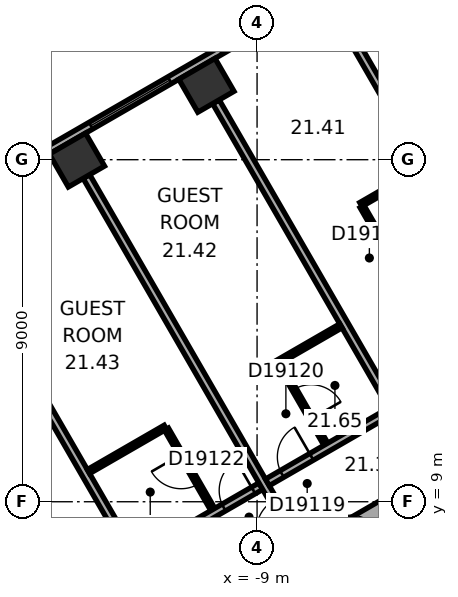
"""IFC4 building model, lengths in metres.
Left out: names, types, materials, properties, quantities, classifications, styles, units other than length and angle.
Written with IfcOpenShell. Run it as: python <this file> out.ifc"""

import sys

from ifc_helpers import new_model, si_unit, direction, frame, frame_2d, origin, origin_2d, place, context, subcontext, project, spatial, rectangle, extrude, element, fill, save


model = new_model("IFC4")
c1 = context("Model", 3, precision=1e-05, world=origin(), true_north=direction((0.0, 1.0)))
c2 = subcontext(c1, "Body", "Model", "MODEL_VIEW")
j1 = project(units=[si_unit("LENGTHUNIT", "METRE"), si_unit("PLANEANGLEUNIT", "RADIAN")], contexts=[c1])
p1 = place(None, origin())
s1 = spatial("IfcSite", under=j1, at=p1, CompositionType="ELEMENT")
p2 = place(p1, origin())
s2 = spatial("IfcBuilding", under=s1, at=p2, CompositionType="ELEMENT")
p3 = place(p2, frame((0.0, 0.0, 93.5)))
s3 = spatial("IfcBuildingStorey", under=s2, at=p3, CompositionType="ELEMENT", Elevation=93.5)
for number, where, z_axis, x_axis in (
    (1, (-10.333, 19.957, 0.0), (0.0, 0.0, 1.0), (-0.866, -0.5, 0.0)),
    (2, (-13.74, 17.99, 0.0), (0.0, 0.0, 1.0), (-0.866, -0.5, 0.0)),
):
    element("IfcColumn", number, at=place(p3, frame(where, z_axis=z_axis, x_axis=x_axis)), inside=s3, PredefinedType="COLUMN", context=c2, shape_type="SweptSolid", body=[
        extrude(rectangle(XDim=1.1, YDim=1.0, at=origin_2d()), origin(), (0.0, 0.0, 1.0), 3.3),
    ])
p4 = place(p3, frame((0.3, 11.836, 0.0), z_axis=(0.0, 0.0, 1.0), x_axis=(-0.866021384402, -0.500006961711, 0.0)))
e3 = element("IfcWall", 3, at=p4, inside=s3, PredefinedType="SHEAR", context=c2, shape_type="SweptSolid", body=[
    extrude(rectangle(XDim=12.355, YDim=1.2, at=frame_2d((6.178, 0.0))), origin(), (0.0, 0.0, 1.0), 3.3),
])
p5 = place(p4, frame((6.378, 0.0, 0.0)))
e4 = element("IfcOpeningElement", 4, at=p5, cuts=e3, PredefinedType="OPENING", context=c2, shape_type="SweptSolid", body=[
    extrude(rectangle(XDim=1.5, YDim=2.1, at=frame_2d((0.75, 1.05))), frame((0.0, 0.61, 0.0), z_axis=(0.0, -1.0, 0.0), x_axis=(1.0, 0.0, 0.0)), (0.0, 0.0, 1.0), 1.22),
])
p6 = place(p4, frame((1.828, 0.0, 0.0)))
e5 = element("IfcOpeningElement", 5, at=p6, cuts=e3, PredefinedType="OPENING", context=c2, shape_type="SweptSolid", body=[
    extrude(rectangle(XDim=1.1, YDim=2.1, at=frame_2d((0.55, 1.05))), frame((0.0, 0.61, 0.0), z_axis=(0.0, -1.0, 0.0), x_axis=(1.0, 0.0, 0.0)), (0.0, 0.0, 1.0), 1.22),
])
p7 = place(p3, frame((-3.136, 24.805, 0.0), z_axis=(0.0, 0.0, 1.0), x_axis=(-0.866028291626, -0.499994998079, 0.0)))
e6 = element("IfcWall", 6, at=p7, inside=s3, PredefinedType="STANDARD", context=c2, shape_type="SweptSolid", body=[
    extrude(rectangle(XDim=21.246, YDim=0.2, at=frame_2d((10.623, 0.0))), origin(), (0.0, 0.0, 1.0), 3.3),
])
p8 = place(p7, frame((1.555, 0.0, 0.8)))
e7 = element("IfcOpeningElement", 7, at=p8, cuts=e6, PredefinedType="OPENING", context=c2, shape_type="SweptSolid", body=[
    extrude(rectangle(XDim=2.4, YDim=1.7, at=frame_2d((1.2, 0.85))), frame((0.0, 0.11, 0.0), z_axis=(0.0, -1.0, 0.0), x_axis=(1.0, 0.0, 0.0)), (0.0, 0.0, 1.0), 0.22),
])
p9 = place(p7, frame((5.489, 0.0, 0.8)))
e8 = element("IfcOpeningElement", 8, at=p9, cuts=e6, PredefinedType="OPENING", context=c2, shape_type="SweptSolid", body=[
    extrude(rectangle(XDim=2.4, YDim=1.7, at=frame_2d((1.2, 0.85))), frame((0.0, 0.11, 0.0), z_axis=(0.0, -1.0, 0.0), x_axis=(1.0, 0.0, 0.0)), (0.0, 0.0, 1.0), 0.22),
])
p10 = place(p7, frame((9.424, 0.0, 0.8)))
e9 = element("IfcOpeningElement", 9, at=p10, cuts=e6, PredefinedType="OPENING", context=c2, shape_type="SweptSolid", body=[
    extrude(rectangle(XDim=2.4, YDim=1.7, at=frame_2d((1.2, 0.85))), frame((0.0, 0.11, 0.0), z_axis=(0.0, -1.0, 0.0), x_axis=(1.0, 0.0, 0.0)), (0.0, 0.0, 1.0), 0.22),
])
p11 = place(p7, frame((13.358, 0.0, 0.8)))
e10 = element("IfcOpeningElement", 10, at=p11, cuts=e6, PredefinedType="OPENING", context=c2, shape_type="SweptSolid", body=[
    extrude(rectangle(XDim=2.4, YDim=1.7, at=frame_2d((1.2, 0.85))), frame((0.0, 0.11, 0.0), z_axis=(0.0, -1.0, 0.0), x_axis=(1.0, 0.0, 0.0)), (0.0, 0.0, 1.0), 0.22),
])
p12 = place(p7, frame((17.293, 0.0, 0.8)))
e11 = element("IfcOpeningElement", 11, at=p12, cuts=e6, PredefinedType="OPENING", context=c2, shape_type="SweptSolid", body=[
    extrude(rectangle(XDim=2.4, YDim=1.7, at=frame_2d((1.2, 0.85))), frame((0.0, 0.11, 0.0), z_axis=(0.0, -1.0, 0.0), x_axis=(1.0, 0.0, 0.0)), (0.0, 0.0, 1.0), 0.22),
])
p13 = place(p3, frame((-16.898, 15.59, 0.0), z_axis=(0.0, 0.0, 1.0), x_axis=(0.499994742786, -0.866028439017, 0.0)))
e12 = element("IfcWall", 12, at=p13, inside=s3, PredefinedType="PARTITIONING", context=c2, shape_type="SweptSolid", body=[
    extrude(rectangle(XDim=9.65, YDim=0.2, at=frame_2d((4.825, 0.0))), origin(), (0.0, 0.0, 1.0), 3.05),
])
p14 = place(p3, frame((-13.436, 9.794, 0.0), z_axis=(0.0, 0.0, 1.0), x_axis=(0.866053246676, 0.499951771596, 0.0)))
e13 = element("IfcWall", 13, at=p14, inside=s3, PredefinedType="PARTITIONING", context=c2, shape_type="SweptSolid", body=[
    extrude(rectangle(XDim=2.335, YDim=0.12, at=frame_2d((1.167, 0.0))), origin(), (0.0, 0.0, 1.0), 3.05),
])
p15 = place(p3, frame((-11.385, 10.909, 0.0), z_axis=(0.0, 0.0, 1.0), x_axis=(0.500077547548, -0.865980627057, 0.0)))
e14 = element("IfcWall", 14, at=p15, inside=s3, PredefinedType="PARTITIONING", context=c2, shape_type="SweptSolid", body=[
    extrude(rectangle(XDim=2.44, YDim=0.12, at=frame_2d((1.22, 0.0))), origin(), (0.0, 0.0, 1.0), 3.05),
])
p16 = place(p15, frame((0.77, 0.0, 0.0)))
e15 = element("IfcOpeningElement", 15, at=p16, cuts=e14, PredefinedType="OPENING", context=c2, shape_type="SweptSolid", body=[
    extrude(rectangle(XDim=0.9, YDim=2.1, at=frame_2d((0.45, 1.05))), frame((0.0, 0.07, 0.0), z_axis=(0.0, -1.0, 0.0), x_axis=(1.0, 0.0, 0.0)), (0.0, 0.0, 1.0), 0.14),
])
p17 = place(p3, frame((-10.083, 19.524, 0.0), z_axis=(0.0, 0.0, 1.0), x_axis=(0.499999662836, -0.866025598446, 0.0)))
e16 = element("IfcWall", 16, at=p17, inside=s3, PredefinedType="PARTITIONING", context=c2, shape_type="SweptSolid", body=[
    extrude(rectangle(XDim=9.25, YDim=0.2, at=frame_2d((4.625, 0.0))), origin(), (0.0, 0.0, 1.0), 2.6),
])
p18 = place(p3, frame((-8.902, 9.41, 0.0), z_axis=(0.0, 0.0, 1.0), x_axis=(-0.866014299198, -0.500019233215, 0.0)))
e17 = element("IfcWall", 17, at=p18, inside=s3, PredefinedType="PARTITIONING", context=c2, shape_type="SweptSolid", body=[
    extrude(rectangle(XDim=3.133, YDim=0.2, at=frame_2d((1.567, 0.0))), origin(), (0.0, 0.0, 1.0), 3.05),
])
p19 = place(p18, frame((0.225, 0.0, 0.0)))
e18 = element("IfcOpeningElement", 18, at=p19, cuts=e17, PredefinedType="OPENING", context=c2, shape_type="SweptSolid", body=[
    extrude(rectangle(XDim=0.9, YDim=2.1, at=frame_2d((0.45, 1.05))), frame((0.0, 0.11, 0.0), z_axis=(0.0, -1.0, 0.0), x_axis=(1.0, 0.0, 0.0)), (0.0, 0.0, 1.0), 0.22),
])
p20 = place(p3, frame((-8.44, 12.679, 0.0), z_axis=(0.0, 0.0, 1.0), x_axis=(0.866044365799, 0.499967155389, 0.0)))
e19 = element("IfcWall", 19, at=p20, inside=s3, PredefinedType="PARTITIONING", context=c2, shape_type="SweptSolid", body=[
    extrude(rectangle(XDim=1.9, YDim=0.12, at=frame_2d((0.95, 0.0))), origin(), (0.0, 0.0, 1.0), 3.05),
])
p21 = place(p3, frame((-7.865, 7.814, 0.0), z_axis=(0.0, 0.0, 1.0), x_axis=(-0.500004234368, 0.866022959057, 0.0)))
e20 = element("IfcWall", 20, at=p21, inside=s3, PredefinedType="PARTITIONING", context=c2, shape_type="SweptSolid", body=[
    extrude(rectangle(XDim=11.25, YDim=0.2, at=frame_2d((5.625, 0.0))), origin(), (0.0, 0.0, 1.0), 3.05),
])
p22 = place(p21, frame((0.5, 0.0, 0.0)))
e21 = element("IfcOpeningElement", 21, at=p22, cuts=e20, PredefinedType="OPENING", context=c2, shape_type="SweptSolid", body=[
    extrude(rectangle(XDim=0.9, YDim=2.1, at=frame_2d((0.45, 1.05))), frame((0.0, 0.11, 0.0), z_axis=(0.0, -1.0, 0.0), x_axis=(1.0, 0.0, 0.0)), (0.0, 0.0, 1.0), 0.22),
])
p23 = place(p3, frame((-7.19, 10.513, 0.0), z_axis=(0.0, 0.0, 1.0), x_axis=(-0.499959183527, 0.866048967903, 0.0)))
e22 = element("IfcWall", 22, at=p23, inside=s3, PredefinedType="PARTITIONING", context=c2, shape_type="SweptSolid", body=[
    extrude(rectangle(XDim=2.44, YDim=0.12, at=frame_2d((1.22, 0.0))), origin(), (0.0, 0.0, 1.0), 3.05),
])
p24 = place(p23, frame((0.77, 0.0, 0.0)))
e23 = element("IfcOpeningElement", 23, at=p24, cuts=e22, PredefinedType="OPENING", context=c2, shape_type="SweptSolid", body=[
    extrude(rectangle(XDim=0.9, YDim=2.1, at=frame_2d((0.45, 1.05))), frame((0.0, 0.07, 0.0), z_axis=(0.0, -1.0, 0.0), x_axis=(1.0, 0.0, 0.0)), (0.0, 0.0, 1.0), 0.14),
])
p25 = place(p3, frame((-6.676, 21.492, 0.0), z_axis=(0.0, 0.0, 1.0), x_axis=(0.500011263043, -0.866018900966, 0.0)))
e24 = element("IfcWall", 24, at=p25, inside=s3, PredefinedType="PARTITIONING", context=c2, shape_type="SweptSolid", body=[
    extrude(rectangle(XDim=8.049, YDim=0.2, at=frame_2d((4.024, 0.0))), origin(), (0.0, 0.0, 1.0), 3.05),
])
p26 = place(p3, frame((-6.268, 16.82, 0.0), z_axis=(0.0, 0.0, 1.0), x_axis=(0.866002662425, 0.500039387122, 0.0)))
e25 = element("IfcWall", 25, at=p26, inside=s3, PredefinedType="PARTITIONING", context=c2, shape_type="SweptSolid", body=[
    extrude(rectangle(XDim=1.4, YDim=0.12, at=frame_2d((0.7, 0.0))), origin(), (0.0, 0.0, 1.0), 3.05),
])
p27 = place(p3, frame((-4.968, 14.569, 0.0), z_axis=(0.0, 0.0, 1.0), x_axis=(-0.500046963369, 0.865998287773, 0.0)))
e26 = element("IfcWall", 26, at=p27, inside=s3, PredefinedType="PARTITIONING", context=c2, shape_type="SweptSolid", body=[
    extrude(rectangle(XDim=2.54, YDim=0.12, at=frame_2d((1.27, 0.0))), origin(), (0.0, 0.0, 1.0), 3.05),
])
p28 = place(p27, frame((0.82, 0.0, 0.0)))
e27 = element("IfcOpeningElement", 27, at=p28, cuts=e26, PredefinedType="OPENING", context=c2, shape_type="SweptSolid", body=[
    extrude(rectangle(XDim=0.9, YDim=2.1, at=frame_2d((0.45, 1.05))), frame((0.0, 0.07, 0.0), z_axis=(0.0, -1.0, 0.0), x_axis=(1.0, 0.0, 0.0)), (0.0, 0.0, 1.0), 0.14),
])
p29 = place(p3, frame((-4.309, 12.061, 0.0), z_axis=(0.0, 0.0, 1.0), x_axis=(-0.866020679205, -0.500008183122, 0.0)))
e28 = element("IfcWall", 28, at=p29, inside=s3, PredefinedType="PARTITIONING", context=c2, shape_type="SweptSolid", body=[
    extrude(rectangle(XDim=5.104, YDim=0.2, at=frame_2d((2.552, 0.0))), origin(), (0.0, 0.0, 1.0), 3.05),
])
p30 = place(p29, frame((0.185, 0.0, 0.0)))
e29 = element("IfcOpeningElement", 29, at=p30, cuts=e28, PredefinedType="OPENING", context=c2, shape_type="SweptSolid", body=[
    extrude(rectangle(XDim=0.9, YDim=2.1, at=frame_2d((0.45, 1.05))), frame((0.0, 0.11, 0.0), z_axis=(0.0, -1.0, 0.0), x_axis=(1.0, 0.0, 0.0)), (0.0, 0.0, 1.0), 0.22),
])
p31 = place(p29, frame((3.761, 0.0, 0.0)))
e30 = element("IfcOpeningElement", 30, at=p31, cuts=e28, PredefinedType="OPENING", context=c2, shape_type="SweptSolid", body=[
    extrude(rectangle(XDim=0.9, YDim=2.1, at=frame_2d((0.45, 1.05))), frame((0.0, 0.11, 0.0), z_axis=(0.0, -1.0, 0.0), x_axis=(1.0, 0.0, 0.0)), (0.0, 0.0, 1.0), 0.22),
])
p32 = place(p10, origin())
e31 = element("IfcWindow", 31, at=p32, inside=s3, PartitioningType="SINGLE_PANEL", PredefinedType="WINDOW", context=c2, shape_type="SweptSolid", body=[
    extrude(rectangle(XDim=2.4, YDim=1.7, at=frame_2d((1.2, 0.85))), frame((0.0, 0.03, 0.0), z_axis=(0.0, -1.0, 0.0), x_axis=(1.0, 0.0, 0.0)), (0.0, 0.0, 1.0), 0.06),
])
fill(e9, e31)
p33 = place(p5, origin())
e32 = element("IfcDoor", 32, at=p33, inside=s3, OperationType="DOUBLE_DOOR_SINGLE_SWING", PredefinedType="DOOR", context=c2, shape_type="SweptSolid", body=[
    extrude(rectangle(XDim=1.5, YDim=2.1, at=frame_2d((0.75, 1.05))), frame((0.0, 0.025, 0.0), z_axis=(0.0, -1.0, 0.0), x_axis=(1.0, 0.0, 0.0)), (0.0, 0.0, 1.0), 0.05),
])
fill(e4, e32)
p34 = place(p28, origin())
e33 = element("IfcDoor", 33, at=p34, inside=s3, OperationType="SINGLE_SWING_LEFT", PredefinedType="DOOR", context=c2, shape_type="SweptSolid", body=[
    extrude(rectangle(XDim=0.9, YDim=2.1, at=frame_2d((0.45, 1.05))), frame((0.0, 0.025, 0.0), z_axis=(0.0, -1.0, 0.0), x_axis=(1.0, 0.0, 0.0)), (0.0, 0.0, 1.0), 0.05),
])
fill(e27, e33)
p35 = place(p31, origin())
e34 = element("IfcDoor", 34, at=p35, inside=s3, OperationType="SINGLE_SWING_LEFT", PredefinedType="DOOR", context=c2, shape_type="SweptSolid", body=[
    extrude(rectangle(XDim=0.9, YDim=2.1, at=frame_2d((0.45, 1.05))), frame((0.0, 0.025, 0.0), z_axis=(0.0, -1.0, 0.0), x_axis=(1.0, 0.0, 0.0)), (0.0, 0.0, 1.0), 0.05),
])
fill(e30, e34)
p36 = place(p24, origin())
e35 = element("IfcDoor", 35, at=p36, inside=s3, OperationType="SINGLE_SWING_LEFT", PredefinedType="DOOR", context=c2, shape_type="SweptSolid", body=[
    extrude(rectangle(XDim=0.9, YDim=2.1, at=frame_2d((0.45, 1.05))), frame((0.0, 0.025, 0.0), z_axis=(0.0, -1.0, 0.0), x_axis=(1.0, 0.0, 0.0)), (0.0, 0.0, 1.0), 0.05),
])
fill(e23, e35)
p37 = place(p19, origin())
e36 = element("IfcDoor", 36, at=p37, inside=s3, OperationType="SINGLE_SWING_LEFT", PredefinedType="DOOR", context=c2, shape_type="SweptSolid", body=[
    extrude(rectangle(XDim=0.9, YDim=2.1, at=frame_2d((0.45, 1.05))), frame((0.0, 0.025, 0.0), z_axis=(0.0, -1.0, 0.0), x_axis=(1.0, 0.0, 0.0)), (0.0, 0.0, 1.0), 0.05),
])
fill(e18, e36)
p38 = place(p16, origin())
e37 = element("IfcDoor", 37, at=p38, inside=s3, OperationType="SINGLE_SWING_LEFT", PredefinedType="DOOR", context=c2, shape_type="SweptSolid", body=[
    extrude(rectangle(XDim=0.9, YDim=2.1, at=frame_2d((0.45, 1.05))), frame((0.0, 0.025, 0.0), z_axis=(0.0, -1.0, 0.0), x_axis=(1.0, 0.0, 0.0)), (0.0, 0.0, 1.0), 0.05),
])
fill(e15, e37)
p39 = place(p22, origin())
e38 = element("IfcDoor", 38, at=p39, inside=s3, OperationType="SINGLE_SWING_LEFT", PredefinedType="DOOR", context=c2, shape_type="SweptSolid", body=[
    extrude(rectangle(XDim=0.9, YDim=2.1, at=frame_2d((0.45, 1.05))), frame((0.0, 0.025, 0.0), z_axis=(0.0, -1.0, 0.0), x_axis=(1.0, 0.0, 0.0)), (0.0, 0.0, 1.0), 0.05),
])
fill(e21, e38)
save(model, sys.argv[1])
